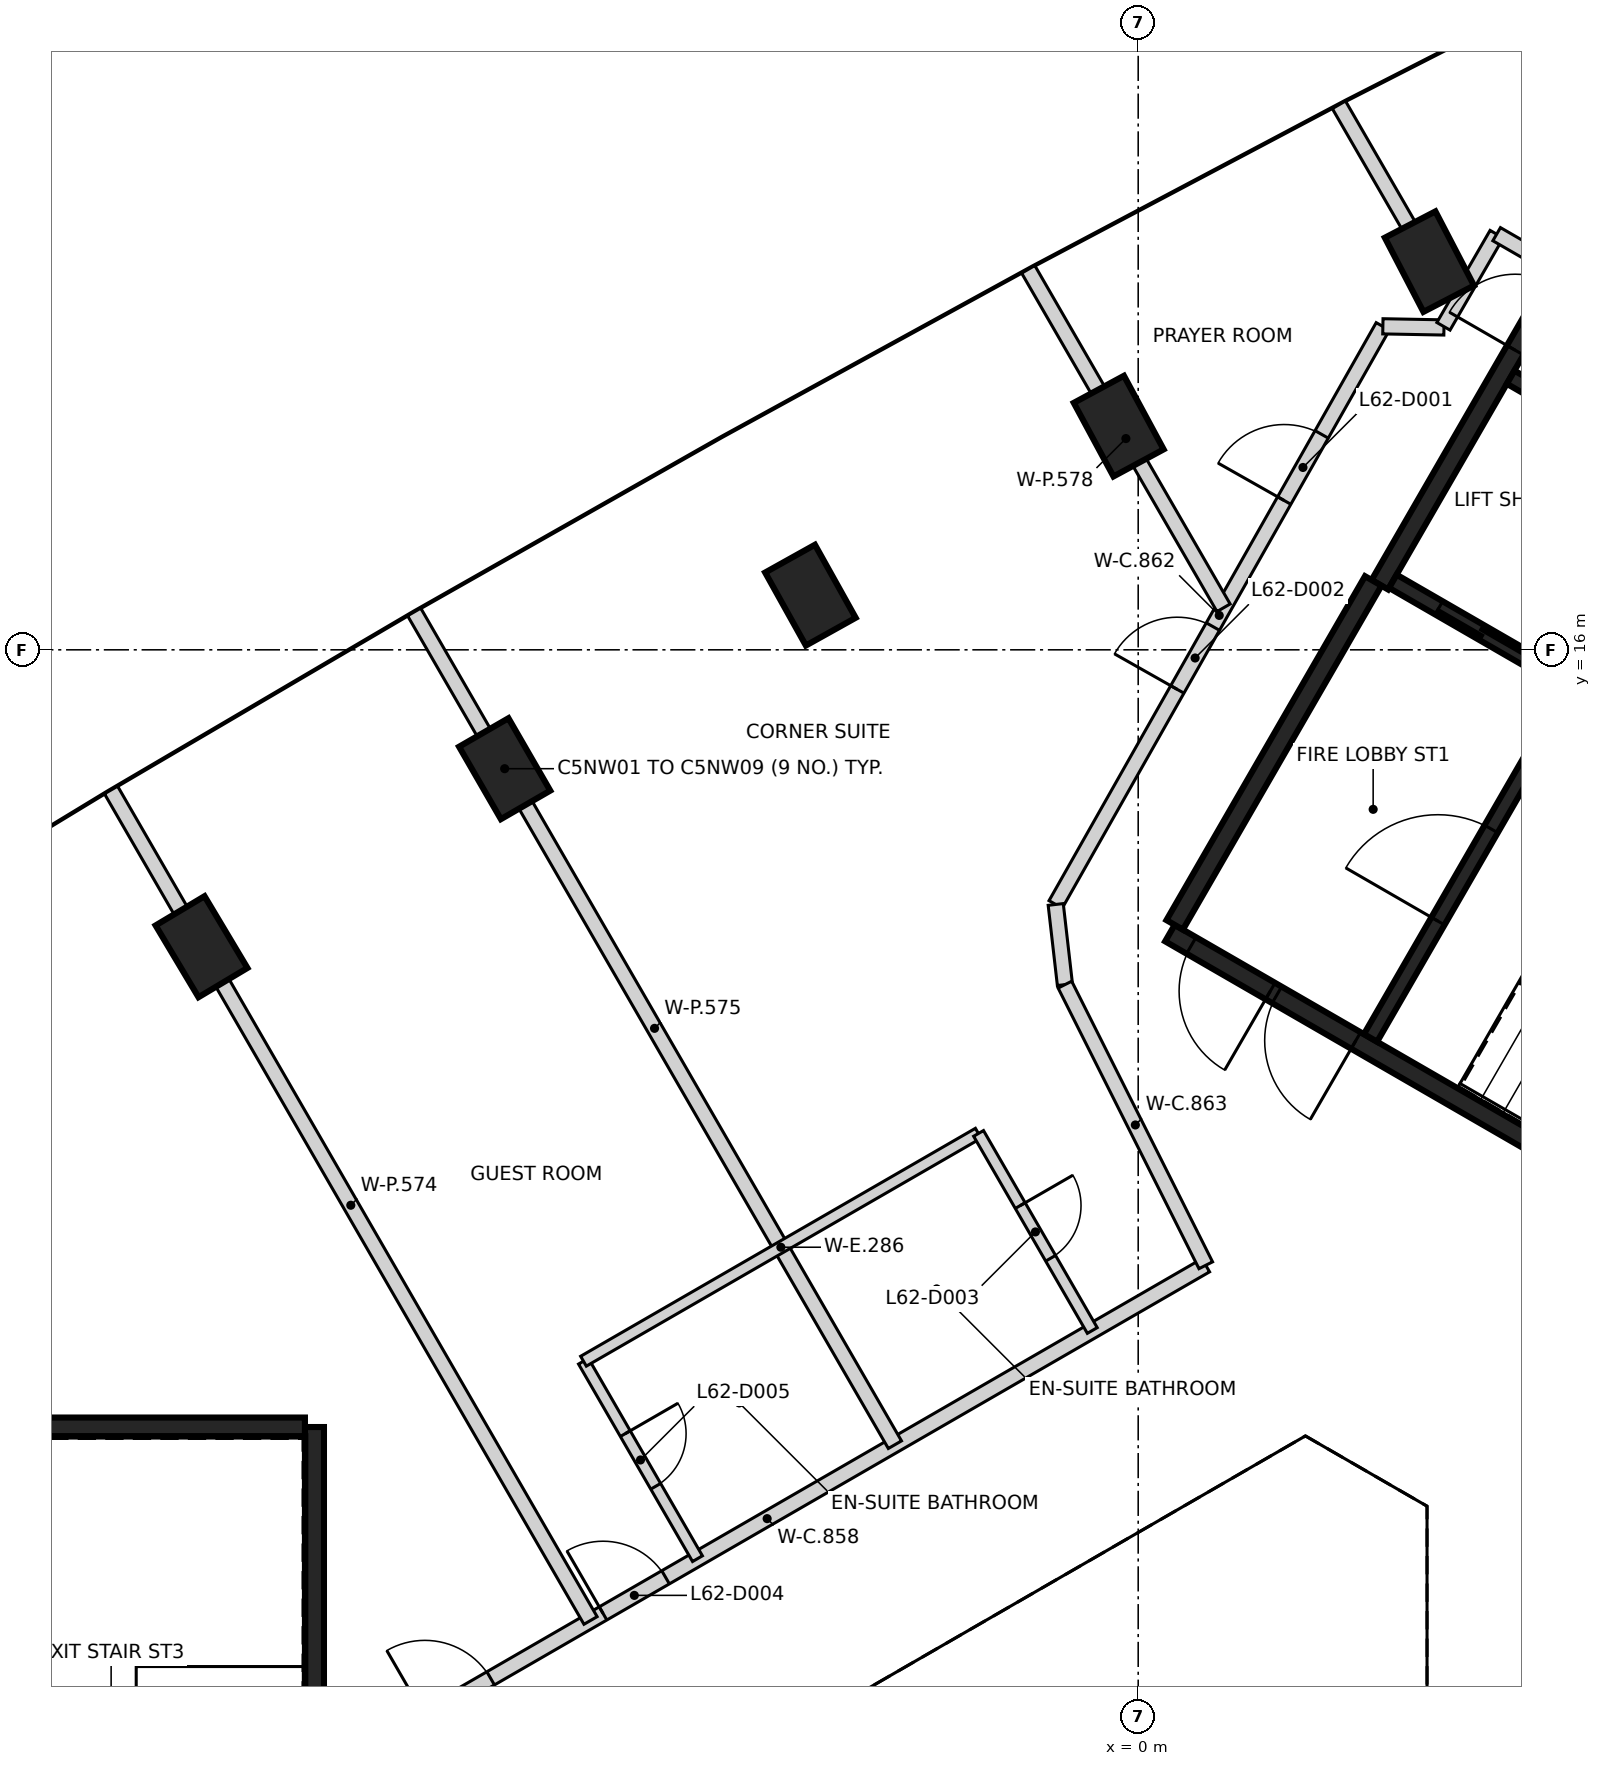
"""IFC4 building model, lengths in metres.
Left out: names, types, materials, properties, quantities, classifications, styles, units other than length and angle.
Written with IfcOpenShell. Run it as: python <this file> out.ifc"""

import sys

from ifc_helpers import new_model, si_unit, direction, frame, frame_2d, origin, origin_2d, place, context, subcontext, project, spatial, rectangle, extrude, element, fill, save


model = new_model("IFC4")
c1 = context("Model", 3, precision=1e-05, world=origin(), true_north=direction((0.0, 1.0)))
c2 = subcontext(c1, "Body", "Model", "MODEL_VIEW")
j1 = project(units=[si_unit("LENGTHUNIT", "METRE"), si_unit("PLANEANGLEUNIT", "RADIAN")], contexts=[c1])
p1 = place(None, origin())
s1 = spatial("IfcSite", under=j1, at=p1, CompositionType="ELEMENT")
p2 = place(p1, origin())
s2 = spatial("IfcBuilding", under=s1, at=p2, CompositionType="ELEMENT")
p3 = place(p2, frame((0.0, 0.0, 246.6)))
s3 = spatial("IfcBuildingStorey", under=s2, at=p3, CompositionType="ELEMENT", Elevation=246.6)
for number, where, z_axis, x_axis in (
    (1, (3.832, 21.107, -0.35), (0.0, 0.0, 1.0), (-0.461, 0.887, 0.0)),
    (2, (-0.256, 18.943, -0.35), (0.0, 0.0, 1.0), (-0.475, 0.88, 0.0)),
    (3, (-4.312, 16.719, -0.35), (0.0, 0.0, 1.0), (-0.487, 0.873, 0.0)),
    (4, (-8.335, 14.436, -0.35), (0.0, 0.0, 1.0), (-0.5, 0.866, 0.0)),
    (5, (-12.323, 12.094, -0.35), (0.0, 0.0, 1.0), (-0.513, 0.858, 0.0)),
):
    element("IfcColumn", number, at=place(p3, frame(where, z_axis=z_axis, x_axis=x_axis)), inside=s3, PredefinedType="COLUMN", context=c2, shape_type="SweptSolid", body=[
        extrude(rectangle(XDim=1.1, YDim=0.75, at=origin_2d()), origin(), (0.0, 0.0, 1.0), 3.6),
    ])
p4 = place(p3, frame((-10.837, 5.775, 0.0), z_axis=(0.0, 0.0, 1.0), x_axis=(0.0, -1.0, 0.0)))
e6 = element("IfcWall", 6, at=p4, inside=s3, PredefinedType="SHEAR", context=c2, shape_type="SweptSolid", body=[
    extrude(rectangle(XDim=11.55, YDim=0.25, at=frame_2d((5.775, 0.0))), origin(), (0.0, 0.0, 1.0), 3.25),
])
p5 = place(p4, frame((10.025, 0.0, 0.0)))
e7 = element("IfcOpeningElement", 7, at=p5, cuts=e6, PredefinedType="OPENING", context=c2, shape_type="SweptSolid", body=[
    extrude(rectangle(XDim=1.2, YDim=2.1, at=frame_2d((0.6, 1.05))), frame((0.0, 0.135, 0.0), z_axis=(0.0, -1.0, 0.0), x_axis=(1.0, 0.0, 0.0)), (0.0, 0.0, 1.0), 0.27),
])
p6 = place(p4, frame((8.725, 0.0, 0.0)))
e8 = element("IfcOpeningElement", 8, at=p6, cuts=e6, PredefinedType="OPENING", context=c2, shape_type="SweptSolid", body=[
    extrude(rectangle(XDim=1.2, YDim=2.1, at=frame_2d((0.6, 1.05))), frame((0.0, 0.135, 0.0), z_axis=(0.0, -1.0, 0.0), x_axis=(1.0, 0.0, 0.0)), (0.0, 0.0, 1.0), 0.27),
])
p7 = place(p3, frame((-16.472, 5.775, 0.0), z_axis=(0.0, 0.0, 1.0), x_axis=(1.0, 0.0, 0.0)))
e9 = element("IfcWall", 9, at=p7, inside=s3, PredefinedType="SHEAR", context=c2, shape_type="SweptSolid", body=[
    extrude(rectangle(XDim=5.51, YDim=0.25, at=frame_2d((2.755, 0.0))), origin(), (0.0, 0.0, 1.0), 3.25),
])
p8 = place(p3, frame((10.42, 6.498, 0.0), z_axis=(0.0, 0.0, 1.0), x_axis=(-0.866021906294, 0.500006057782, 0.0)))
e10 = element("IfcWall", 10, at=p8, inside=s3, PredefinedType="SHEAR", context=c2, shape_type="SweptSolid", body=[
    extrude(rectangle(XDim=11.55, YDim=0.25, at=frame_2d((5.775, 0.0))), origin(), (0.0, 0.0, 1.0), 3.25),
])
p9 = place(p8, frame((10.025, 0.0, 0.0)))
e11 = element("IfcOpeningElement", 11, at=p9, cuts=e10, PredefinedType="OPENING", context=c2, shape_type="SweptSolid", body=[
    extrude(rectangle(XDim=1.2, YDim=2.1, at=frame_2d((0.6, 1.05))), frame((0.0, 0.135, 0.0), z_axis=(0.0, -1.0, 0.0), x_axis=(1.0, 0.0, 0.0)), (0.0, 0.0, 1.0), 0.27),
])
p10 = place(p8, frame((8.725, 0.0, 0.0)))
e12 = element("IfcOpeningElement", 12, at=p10, cuts=e10, PredefinedType="OPENING", context=c2, shape_type="SweptSolid", body=[
    extrude(rectangle(XDim=1.2, YDim=2.1, at=frame_2d((0.6, 1.05))), frame((0.0, 0.135, 0.0), z_axis=(0.0, -1.0, 0.0), x_axis=(1.0, 0.0, 0.0)), (0.0, 0.0, 1.0), 0.27),
])
p11 = place(p3, frame((3.179, 16.856, 0.0), z_axis=(0.0, 0.0, 1.0), x_axis=(0.500001955336, 0.866024274868, 0.0)))
e13 = element("IfcWall", 13, at=p11, inside=s3, PredefinedType="SHEAR", context=c2, shape_type="SweptSolid", body=[
    extrude(rectangle(XDim=6.125, YDim=0.25, at=frame_2d((3.062, 0.0))), origin(), (0.0, 0.0, 1.0), 3.25),
])
p12 = place(p11, frame((3.563, 0.0, 0.0)))
e14 = element("IfcOpeningElement", 14, at=p12, cuts=e13, PredefinedType="OPENING", context=c2, shape_type="SweptSolid", body=[
    extrude(rectangle(XDim=1.0, YDim=2.1, at=frame_2d((0.5, 1.05))), frame((0.0, 0.135, 0.0), z_axis=(0.0, -1.0, 0.0), x_axis=(1.0, 0.0, 0.0)), (0.0, 0.0, 1.0), 0.27),
])
p13 = place(p3, frame((0.48, 12.381, 0.0), z_axis=(0.0, 0.0, 1.0), x_axis=(0.49999885962, 0.866026062182, 0.0)))
e15 = element("IfcWall", 15, at=p13, inside=s3, PredefinedType="SHEAR", context=c2, shape_type="SweptSolid", body=[
    extrude(rectangle(XDim=5.225, YDim=0.25, at=frame_2d((2.612, 0.0))), origin(), (0.0, 0.0, 1.0), 3.25),
])
p14 = place(p3, frame((3.057, 10.895, 0.0), z_axis=(0.0, 0.0, 1.0), x_axis=(0.500027839223, 0.866009330205, 0.0)))
e16 = element("IfcWall", 16, at=p14, inside=s3, PredefinedType="SHEAR", context=c2, shape_type="SweptSolid", body=[
    extrude(rectangle(XDim=5.098, YDim=0.2, at=frame_2d((2.549, 0.0))), origin(), (0.0, 0.0, 1.0), 3.25),
])
p15 = place(p14, frame((1.774, 0.0, 0.0)))
e17 = element("IfcOpeningElement", 17, at=p15, cuts=e16, PredefinedType="OPENING", context=c2, shape_type="SweptSolid", body=[
    extrude(rectangle(XDim=1.4, YDim=2.1, at=frame_2d((0.7, 1.05))), frame((0.0, 0.11, 0.0), z_axis=(0.0, -1.0, 0.0), x_axis=(1.0, 0.0, 0.0)), (0.0, 0.0, 1.0), 0.22),
])
p16 = place(p3, frame((5.646, 15.576, 0.0), z_axis=(0.0, 0.0, 1.0), x_axis=(-0.866018407898, 0.500012117035, 0.0)))
e18 = element("IfcWall", 18, at=p16, inside=s3, PredefinedType="SHEAR", context=c2, shape_type="SweptSolid", body=[
    extrude(rectangle(XDim=2.651, YDim=0.2, at=frame_2d((1.325, 0.0))), origin(), (0.0, 0.0, 1.0), 3.25),
])
p17 = place(p16, frame((0.652, 0.0, 0.0)))
e19 = element("IfcOpeningElement", 19, at=p17, cuts=e18, PredefinedType="OPENING", context=c2, shape_type="SweptSolid", body=[
    extrude(rectangle(XDim=1.3, YDim=2.1, at=frame_2d((0.65, 1.05))), frame((0.0, 0.11, 0.0), z_axis=(0.0, -1.0, 0.0), x_axis=(1.0, 0.0, 0.0)), (0.0, 0.0, 1.0), 0.22),
])
p18 = place(p3, frame((7.196, 18.26, 0.0), z_axis=(0.0, 0.0, 1.0), x_axis=(-0.866018407898, 0.500012117035, 0.0)))
e20 = element("IfcWall", 20, at=p18, inside=s3, PredefinedType="SHEAR", context=c2, shape_type="SweptSolid", body=[
    extrude(rectangle(XDim=2.651, YDim=0.2, at=frame_2d((1.325, 0.0))), origin(), (0.0, 0.0, 1.0), 3.25),
])
p19 = place(p3, frame((-10.652, 1.237, 0.0), z_axis=(0.0, 0.0, 1.0), x_axis=(0.865922902183, 0.50017749597, 0.0)))
e21 = element("IfcWall", 21, at=p19, inside=s3, PredefinedType="PARTITIONING", context=c2, shape_type="SweptSolid", body=[
    extrude(rectangle(XDim=13.328, YDim=0.2, at=frame_2d((6.664, 0.0))), origin(), (0.0, 0.0, 1.0), 3.25),
])
p20 = place(p19, frame((4.171, 0.0, 0.0)))
e22 = element("IfcOpeningElement", 22, at=p20, cuts=e21, PredefinedType="OPENING", context=c2, shape_type="SweptSolid", body=[
    extrude(rectangle(XDim=0.95, YDim=2.1, at=frame_2d((0.475, 1.05))), frame((0.0, 0.11, 0.0), z_axis=(0.0, -1.0, 0.0), x_axis=(1.0, 0.0, 0.0)), (0.0, 0.0, 1.0), 0.22),
])
p21 = place(p19, frame((1.463, 0.0, 0.0)))
e23 = element("IfcOpeningElement", 23, at=p21, cuts=e21, PredefinedType="OPENING", context=c2, shape_type="SweptSolid", body=[
    extrude(rectangle(XDim=1.0, YDim=2.1, at=frame_2d((0.5, 1.05))), frame((0.0, 0.11, 0.0), z_axis=(0.0, -1.0, 0.0), x_axis=(1.0, 0.0, 0.0)), (0.0, 0.0, 1.0), 0.22),
])
p22 = place(p3, frame((-1.086, 12.651, 0.0), z_axis=(0.0, 0.0, 1.0), x_axis=(0.492590234691, 0.870261374925, 0.0)))
e24 = element("IfcWall", 24, at=p22, inside=s3, PredefinedType="PARTITIONING", context=c2, shape_type="SweptSolid", body=[
    extrude(rectangle(XDim=8.738, YDim=0.2, at=frame_2d((4.369, 0.0))), origin(), (0.0, 0.0, 1.0), 3.25),
])
p23 = place(p22, frame((6.105, 0.0, 0.0)))
e25 = element("IfcOpeningElement", 25, at=p23, cuts=e24, PredefinedType="OPENING", context=c2, shape_type="SweptSolid", body=[
    extrude(rectangle(XDim=1.0, YDim=2.1, at=frame_2d((0.5, 1.05))), frame((0.0, 0.11, 0.0), z_axis=(0.0, -1.0, 0.0), x_axis=(1.0, 0.0, 0.0)), (0.0, 0.0, 1.0), 0.22),
])
p24 = place(p22, frame((3.25, 0.0, 0.0)))
e26 = element("IfcOpeningElement", 26, at=p24, cuts=e24, PredefinedType="OPENING", context=c2, shape_type="SweptSolid", body=[
    extrude(rectangle(XDim=0.95, YDim=2.1, at=frame_2d((0.475, 1.05))), frame((0.0, 0.11, 0.0), z_axis=(0.0, -1.0, 0.0), x_axis=(1.0, 0.0, 0.0)), (0.0, 0.0, 1.0), 0.22),
])
p25 = place(p3, frame((-1.085, 12.65, 0.0), z_axis=(0.0, 0.0, 1.0), x_axis=(0.113812454263, -0.993502252264, 0.0)))
e27 = element("IfcWall", 27, at=p25, inside=s3, PredefinedType="PARTITIONING", context=c2, shape_type="SweptSolid", body=[
    extrude(rectangle(XDim=1.062, YDim=0.2, at=frame_2d((0.531, 0.0))), origin(), (0.0, 0.0, 1.0), 3.25),
])
p26 = place(p3, frame((-0.964, 11.595, 0.0), z_axis=(0.0, 0.0, 1.0), x_axis=(0.448584236569, -0.893740556706, 0.0)))
e28 = element("IfcWall", 28, at=p26, inside=s3, PredefinedType="PARTITIONING", context=c2, shape_type="SweptSolid", body=[
    extrude(rectangle(XDim=4.131, YDim=0.2, at=frame_2d((2.065, 0.0))), origin(), (0.0, 0.0, 1.0), 3.25),
])
p27 = place(p3, frame((3.219, 20.256, 0.0), z_axis=(0.0, 0.0, 1.0), x_axis=(0.99982280377, -0.018824480363, 0.0)))
e29 = element("IfcWall", 29, at=p27, inside=s3, PredefinedType="PARTITIONING", context=c2, shape_type="SweptSolid", body=[
    extrude(rectangle(XDim=0.804, YDim=0.2, at=frame_2d((0.402, 0.0))), origin(), (0.0, 0.0, 1.0), 3.25),
])
p28 = place(p3, frame((4.016, 20.256, 0.0), z_axis=(0.0, 0.0, 1.0), x_axis=(0.500135180047, 0.865947343479, 0.0)))
e30 = element("IfcWall", 30, at=p28, inside=s3, PredefinedType="PARTITIONING", context=c2, shape_type="SweptSolid", body=[
    extrude(rectangle(XDim=1.399, YDim=0.2, at=frame_2d((0.7, 0.0))), origin(), (0.0, 0.0, 1.0), 2.35),
])
p29 = place(p3, frame((4.716, 21.468, 0.0), z_axis=(0.0, 0.0, 1.0), x_axis=(0.865912682783, -0.500195187698, 0.0)))
e31 = element("IfcWall", 31, at=p29, inside=s3, PredefinedType="PARTITIONING", context=c2, shape_type="SweptSolid", body=[
    extrude(rectangle(XDim=0.79, YDim=0.2, at=frame_2d((0.395, 0.0))), origin(), (0.0, 0.0, 1.0), 2.35),
])
p30 = place(p3, frame((-13.513, 14.156, 0.0), z_axis=(0.0, 0.0, 1.0), x_axis=(0.500012240511, -0.866018336607, 0.0)))
e32 = element("IfcWall", 32, at=p30, inside=s3, PredefinedType="PARTITIONING", context=c2, shape_type="SweptSolid", body=[
    extrude(rectangle(XDim=12.616, YDim=0.2, at=frame_2d((6.308, 0.0))), origin(), (0.0, 0.0, 1.0), 3.25),
])
p31 = place(p3, frame((-9.525, 16.498, 0.0), z_axis=(0.0, 0.0, 1.0), x_axis=(0.499979175972, -0.866037426209, 0.0)))
e33 = element("IfcWall", 33, at=p31, inside=s3, PredefinedType="PARTITIONING", context=c2, shape_type="SweptSolid", body=[
    extrude(rectangle(XDim=12.65, YDim=0.2, at=frame_2d((6.325, 0.0))), origin(), (0.0, 0.0, 1.0), 3.25),
])
p32 = place(p3, frame((-1.447, 21.005, 0.0), z_axis=(0.0, 0.0, 1.0), x_axis=(0.49988826685, -0.866089903339, 0.0)))
e34 = element("IfcWall", 34, at=p32, inside=s3, PredefinedType="PARTITIONING", context=c2, shape_type="SweptSolid", body=[
    extrude(rectangle(XDim=5.141, YDim=0.2, at=frame_2d((2.57, 0.0))), origin(), (0.0, 0.0, 1.0), 3.25),
])
p33 = place(p3, frame((2.64, 23.17, 0.0), z_axis=(0.0, 0.0, 1.0), x_axis=(0.49992507759, -0.866068655937, 0.0)))
e35 = element("IfcWall", 35, at=p33, inside=s3, PredefinedType="PARTITIONING", context=c2, shape_type="SweptSolid", body=[
    extrude(rectangle(XDim=2.712, YDim=0.2, at=frame_2d((1.356, 0.0))), origin(), (0.0, 0.0, 1.0), 3.25),
])
p34 = place(p3, frame((-7.298, 6.641, 0.0), z_axis=(0.0, 0.0, 1.0), x_axis=(0.499990139034, -0.866031096941, 0.0)))
e36 = element("IfcWall", 36, at=p34, inside=s3, PredefinedType="PARTITIONING", context=c2, shape_type="SweptSolid", body=[
    extrude(rectangle(XDim=3.0, YDim=0.15, at=frame_2d((1.5, 0.0))), origin(), (0.0, 0.0, 1.0), 3.25),
])
p35 = place(p34, frame((1.1, 0.0, 0.0)))
e37 = element("IfcOpeningElement", 37, at=p35, cuts=e36, PredefinedType="OPENING", context=c2, shape_type="SweptSolid", body=[
    extrude(rectangle(XDim=0.8, YDim=2.1, at=frame_2d((0.4, 1.05))), frame((0.0, 0.085, 0.0), z_axis=(0.0, -1.0, 0.0), x_axis=(1.0, 0.0, 0.0)), (0.0, 0.0, 1.0), 0.17),
])
p36 = place(p3, frame((-7.298, 6.641, 0.0), z_axis=(0.0, 0.0, 1.0), x_axis=(0.865999837459, 0.50004427956, 0.0)))
e38 = element("IfcWall", 38, at=p36, inside=s3, PredefinedType="PARTITIONING", context=c2, shape_type="SweptSolid", body=[
    extrude(rectangle(XDim=5.998, YDim=0.15, at=frame_2d((2.999, 0.0))), origin(), (0.0, 0.0, 1.0), 3.25),
])
p37 = place(p3, frame((-2.1, 9.638, 0.0), z_axis=(0.0, 0.0, 1.0), x_axis=(0.499753046638, -0.866167935435, 0.0)))
e39 = element("IfcWall", 39, at=p37, inside=s3, PredefinedType="PARTITIONING", context=c2, shape_type="SweptSolid", body=[
    extrude(rectangle(XDim=2.994, YDim=0.15, at=frame_2d((1.497, 0.0))), origin(), (0.0, 0.0, 1.0), 3.25),
])
p38 = place(p37, frame((1.096, 0.0, 0.0)))
e40 = element("IfcOpeningElement", 40, at=p38, cuts=e39, PredefinedType="OPENING", context=c2, shape_type="SweptSolid", body=[
    extrude(rectangle(XDim=0.8, YDim=2.1, at=frame_2d((0.4, 1.05))), frame((0.0, 0.085, 0.0), z_axis=(0.0, -1.0, 0.0), x_axis=(1.0, 0.0, 0.0)), (0.0, 0.0, 1.0), 0.17),
])
p39 = place(p17, origin())
e41 = element("IfcDoor", 41, at=p39, inside=s3, OperationType="SLIDING_TO_LEFT", PredefinedType="DOOR", context=c2, shape_type="SweptSolid", body=[
    extrude(rectangle(XDim=1.3, YDim=2.1, at=frame_2d((0.65, 1.05))), frame((0.0, 0.025, 0.0), z_axis=(0.0, -1.0, 0.0), x_axis=(1.0, 0.0, 0.0)), (0.0, 0.0, 1.0), 0.05),
])
fill(e19, e41)
p40 = place(p12, origin())
e42 = element("IfcDoor", 42, at=p40, inside=s3, OperationType="SINGLE_SWING_LEFT", PredefinedType="DOOR", context=c2, shape_type="SweptSolid", body=[
    extrude(rectangle(XDim=1.0, YDim=2.1, at=frame_2d((0.5, 1.05))), frame((0.0, 0.025, 0.0), z_axis=(0.0, -1.0, 0.0), x_axis=(1.0, 0.0, 0.0)), (0.0, 0.0, 1.0), 0.05),
])
fill(e14, e42)
p41 = place(p9, origin())
e43 = element("IfcDoor", 43, at=p41, inside=s3, OperationType="SINGLE_SWING_LEFT", PredefinedType="DOOR", context=c2, shape_type="SweptSolid", body=[
    extrude(rectangle(XDim=1.2, YDim=2.1, at=frame_2d((0.6, 1.05))), frame((0.0, 0.025, 0.0), z_axis=(0.0, -1.0, 0.0), x_axis=(1.0, 0.0, 0.0)), (0.0, 0.0, 1.0), 0.05),
])
fill(e11, e43)
p42 = place(p10, origin())
e44 = element("IfcDoor", 44, at=p42, inside=s3, OperationType="SINGLE_SWING_RIGHT", PredefinedType="DOOR", context=c2, shape_type="SweptSolid", body=[
    extrude(rectangle(XDim=1.2, YDim=2.1, at=frame_2d((0.6, 1.05))), frame((0.0, 0.025, 0.0), z_axis=(0.0, -1.0, 0.0), x_axis=(1.0, 0.0, 0.0)), (0.0, 0.0, 1.0), 0.05),
])
fill(e12, e44)
p43 = place(p15, origin())
e45 = element("IfcDoor", 45, at=p43, inside=s3, OperationType="SINGLE_SWING_LEFT", PredefinedType="DOOR", context=c2, shape_type="SweptSolid", body=[
    extrude(rectangle(XDim=1.4, YDim=2.1, at=frame_2d((0.7, 1.05))), frame((0.0, 0.025, 0.0), z_axis=(0.0, -1.0, 0.0), x_axis=(1.0, 0.0, 0.0)), (0.0, 0.0, 1.0), 0.05),
])
fill(e17, e45)
p44 = place(p23, origin())
e46 = element("IfcDoor", 46, at=p44, inside=s3, OperationType="SINGLE_SWING_LEFT", PredefinedType="DOOR", context=c2, shape_type="SweptSolid", body=[
    extrude(rectangle(XDim=1.0, YDim=2.1, at=frame_2d((0.5, 1.05))), frame((0.0, 0.025, 0.0), z_axis=(0.0, -1.0, 0.0), x_axis=(1.0, 0.0, 0.0)), (0.0, 0.0, 1.0), 0.05),
])
fill(e25, e46)
p45 = place(p24, origin())
e47 = element("IfcDoor", 47, at=p45, inside=s3, OperationType="SINGLE_SWING_LEFT", PredefinedType="DOOR", context=c2, shape_type="SweptSolid", body=[
    extrude(rectangle(XDim=0.95, YDim=2.1, at=frame_2d((0.475, 1.05))), frame((0.0, 0.025, 0.0), z_axis=(0.0, -1.0, 0.0), x_axis=(1.0, 0.0, 0.0)), (0.0, 0.0, 1.0), 0.05),
])
fill(e26, e47)
p46 = place(p38, origin())
e48 = element("IfcDoor", 48, at=p46, inside=s3, OperationType="SINGLE_SWING_LEFT", PredefinedType="DOOR", context=c2, shape_type="SweptSolid", body=[
    extrude(rectangle(XDim=0.8, YDim=2.1, at=frame_2d((0.4, 1.05))), frame((0.0, 0.025, 0.0), z_axis=(0.0, -1.0, 0.0), x_axis=(1.0, 0.0, 0.0)), (0.0, 0.0, 1.0), 0.05),
])
fill(e40, e48)
p47 = place(p20, origin())
e49 = element("IfcDoor", 49, at=p47, inside=s3, OperationType="SINGLE_SWING_LEFT", PredefinedType="DOOR", context=c2, shape_type="SweptSolid", body=[
    extrude(rectangle(XDim=0.95, YDim=2.1, at=frame_2d((0.475, 1.05))), frame((0.0, 0.025, 0.0), z_axis=(0.0, -1.0, 0.0), x_axis=(1.0, 0.0, 0.0)), (0.0, 0.0, 1.0), 0.05),
])
fill(e22, e49)
p48 = place(p35, origin())
e50 = element("IfcDoor", 50, at=p48, inside=s3, OperationType="SINGLE_SWING_LEFT", PredefinedType="DOOR", context=c2, shape_type="SweptSolid", body=[
    extrude(rectangle(XDim=0.8, YDim=2.1, at=frame_2d((0.4, 1.05))), frame((0.0, 0.025, 0.0), z_axis=(0.0, -1.0, 0.0), x_axis=(1.0, 0.0, 0.0)), (0.0, 0.0, 1.0), 0.05),
])
fill(e37, e50)
p49 = place(p21, origin())
e51 = element("IfcDoor", 51, at=p49, inside=s3, OperationType="SINGLE_SWING_LEFT", PredefinedType="DOOR", context=c2, shape_type="SweptSolid", body=[
    extrude(rectangle(XDim=1.0, YDim=2.1, at=frame_2d((0.5, 1.05))), frame((0.0, 0.025, 0.0), z_axis=(0.0, -1.0, 0.0), x_axis=(1.0, 0.0, 0.0)), (0.0, 0.0, 1.0), 0.05),
])
fill(e23, e51)
save(model, sys.argv[1])
